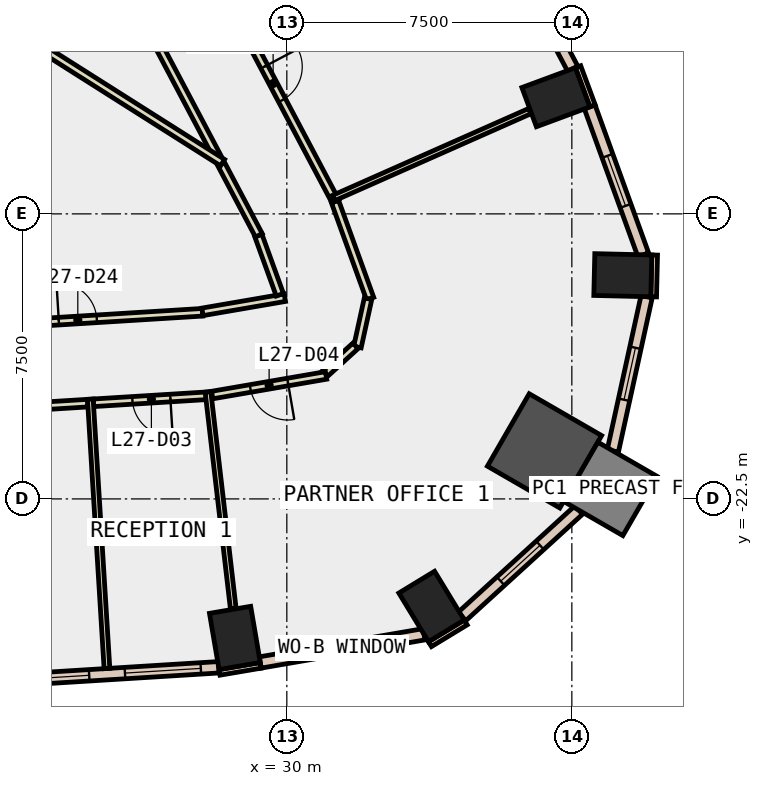
"""IFC4 building model, lengths in metres.
Left out: names, types, materials, properties, quantities, classifications, styles, units other than length and angle.
Written with IfcOpenShell. Run it as: python <this file> out.ifc"""

import sys

from ifc_helpers import new_model, si_unit, direction, frame, frame_2d, origin, origin_2d, place, context, subcontext, project, spatial, rectangle, extrude, element, fill, save


model = new_model("IFC4")
c1 = context("Model", 3, precision=1e-05, world=origin(), true_north=direction((0.0, 1.0)))
c2 = subcontext(c1, "Body", "Model", "MODEL_VIEW")
j1 = project(units=[si_unit("LENGTHUNIT", "METRE"), si_unit("PLANEANGLEUNIT", "RADIAN")], contexts=[c1])
p1 = place(None, origin())
s1 = spatial("IfcSite", under=j1, at=p1, CompositionType="ELEMENT")
p2 = place(p1, origin())
s2 = spatial("IfcBuilding", under=s1, at=p2, CompositionType="ELEMENT")
p3 = place(p2, frame((0.0, 0.0, 124.4)))
s3 = spatial("IfcBuildingStorey", under=s2, at=p3, CompositionType="ELEMENT", Elevation=124.4)
for number, where, z_axis, x_axis in (
    (1, (28.633, -26.158, -0.4), (0.0, 0.0, 1.0), (0.986, 0.168, 0.0)),
    (2, (33.808, -25.331, -0.4), (0.0, 0.0, 1.0), (0.854, 0.52, 0.0)),
):
    element("IfcColumn", number, at=place(p3, frame(where, z_axis=z_axis, x_axis=x_axis)), inside=s3, PredefinedType="COLUMN", context=c2, shape_type="SweptSolid", body=[
        extrude(rectangle(XDim=1.1, YDim=1.5, at=origin_2d()), origin(), (0.0, 0.0, 1.0), 4.2),
    ])
p4 = place(p3, frame((36.781, -21.236, -0.4), z_axis=(0.0, 0.0, 1.0), x_axis=(-0.866025403784, 0.5, 0.0)))
e3 = element("IfcColumn", 3, at=p4, inside=s3, PredefinedType="COLUMN", context=c2, shape_type="SweptSolid", body=[
    extrude(rectangle(XDim=2.2, YDim=2.2, at=origin_2d()), origin(), (0.0, 0.0, 1.0), 4.2),
])
for number, where, z_axis, x_axis in (
    (4, (38.841, -16.614, -0.4), (0.0, 0.0, 1.0), (0.023, 1.0, 0.0)),
    (5, (37.08, -11.931, -0.4), (0.0, 0.0, 1.0), (-0.347, 0.938, 0.0)),
):
    element("IfcColumn", number, at=place(p3, frame(where, z_axis=z_axis, x_axis=x_axis)), inside=s3, PredefinedType="COLUMN", context=c2, shape_type="SweptSolid", body=[
        extrude(rectangle(XDim=1.1, YDim=1.5, at=origin_2d()), origin(), (0.0, 0.0, 1.0), 4.2),
    ])
p5 = place(p3, frame((38.513, -22.236, -0.4), z_axis=(0.0, 0.0, 1.0), x_axis=(-0.866025403784, 0.5, 0.0)))
e6 = element("IfcColumn", 6, at=p5, inside=s3, PredefinedType="COLUMN", context=c2, shape_type="SweptSolid", body=[
    extrude(rectangle(XDim=1.8, YDim=1.8, at=origin_2d()), origin(), (0.0, 0.0, 1.0), 4.2),
])
p6 = place(p3, frame((38.045, -12.16, 0.0), z_axis=(0.0, 0.0, 1.0), x_axis=(-0.347010833361, 0.937861120598, 0.0)))
e7 = element("IfcWall", 7, at=p6, inside=s3, PredefinedType="STANDARD", context=c2, shape_type="SweptSolid", body=[
    extrude(rectangle(XDim=1.1, YDim=0.15, at=frame_2d((0.55, 0.0))), origin(), (0.0, 0.0, 1.0), 3.8),
])
p7 = place(p3, frame((28.229, -27.064, 0.0), z_axis=(0.0, 0.0, 1.0), x_axis=(0.985763338892, 0.168138751323, 0.0)))
e8 = element("IfcWall", 8, at=p7, inside=s3, PredefinedType="STANDARD", context=c2, shape_type="SweptSolid", body=[
    extrude(rectangle(XDim=1.101, YDim=0.15, at=frame_2d((0.55, 0.0))), origin(), (0.0, 0.0, 1.0), 3.8),
])
for number, where, z_axis, x_axis in (
    (9, (33.767, -26.322, 0.0), (0.0, 0.0, 1.0), (0.854, 0.52, 0.0)),
    (10, (39.653, -17.183, 0.0), (0.0, 0.0, 1.0), (0.024, 1.0, 0.0)),
):
    element("IfcWall", number, at=place(p3, frame(where, z_axis=z_axis, x_axis=x_axis)), inside=s3, PredefinedType="STANDARD", context=c2, shape_type="SweptSolid", body=[
        extrude(rectangle(XDim=1.1, YDim=0.15, at=frame_2d((0.55, 0.0))), origin(), (0.0, 0.0, 1.0), 3.8),
    ])
p8 = place(p3, frame((22.332, -27.294, 0.0), z_axis=(0.0, 0.0, 1.0), x_axis=(0.998086636664, 0.061830944626, 0.0)))
e11 = element("IfcWall", 11, at=p8, inside=s3, PredefinedType="STANDARD", context=c2, shape_type="SweptSolid", body=[
    extrude(rectangle(XDim=5.887, YDim=0.3, at=frame_2d((2.944, 0.0))), origin(), (0.0, 0.0, 1.0), 3.8),
])
p9 = place(p8, frame((0.472, 0.0, 0.9)))
e12 = element("IfcOpeningElement", 12, at=p9, cuts=e11, PredefinedType="OPENING", context=c2, shape_type="SweptSolid", body=[
    extrude(rectangle(XDim=2.0, YDim=2.6, at=frame_2d((1.0, 1.3))), frame((0.0, 0.16, 0.0), z_axis=(0.0, -1.0, 0.0), x_axis=(1.0, 0.0, 0.0)), (0.0, 0.0, 1.0), 0.32),
])
p10 = place(p8, frame((3.415, 0.0, 0.9)))
e13 = element("IfcOpeningElement", 13, at=p10, cuts=e11, PredefinedType="OPENING", context=c2, shape_type="SweptSolid", body=[
    extrude(rectangle(XDim=2.0, YDim=2.6, at=frame_2d((1.0, 1.3))), frame((0.0, 0.16, 0.0), z_axis=(0.0, -1.0, 0.0), x_axis=(1.0, 0.0, 0.0)), (0.0, 0.0, 1.0), 0.32),
])
p11 = place(p3, frame((29.3, -26.804, 0.0), z_axis=(0.0, 0.0, 1.0), x_axis=(0.985504881957, 0.169647067875, 0.0)))
e14 = element("IfcWall", 14, at=p11, inside=s3, PredefinedType="STANDARD", context=c2, shape_type="SweptSolid", body=[
    extrude(rectangle(XDim=4.374, YDim=0.3, at=frame_2d((2.187, 0.0))), origin(), (0.0, 0.0, 1.0), 3.8),
])
p12 = place(p11, frame((1.487, 0.0, 0.9)))
e15 = element("IfcOpeningElement", 15, at=p12, cuts=e14, PredefinedType="OPENING", context=c2, shape_type="SweptSolid", body=[
    extrude(rectangle(XDim=1.4, YDim=2.6, at=frame_2d((0.7, 1.3))), frame((0.0, 0.16, 0.0), z_axis=(0.0, -1.0, 0.0), x_axis=(1.0, 0.0, 0.0)), (0.0, 0.0, 1.0), 0.32),
])
p13 = place(p3, frame((34.61, -25.593, 0.0), z_axis=(0.0, 0.0, 1.0), x_axis=(0.738825046606, 0.673897284835, 0.0)))
e16 = element("IfcWall", 16, at=p13, inside=s3, PredefinedType="STANDARD", context=c2, shape_type="SweptSolid", body=[
    extrude(rectangle(XDim=4.155, YDim=0.3, at=frame_2d((2.078, 0.0))), origin(), (0.0, 0.0, 1.0), 3.8),
])
p14 = place(p13, frame((1.378, 0.0, 0.9)))
e17 = element("IfcOpeningElement", 17, at=p14, cuts=e16, PredefinedType="OPENING", context=c2, shape_type="SweptSolid", body=[
    extrude(rectangle(XDim=1.4, YDim=2.6, at=frame_2d((0.7, 1.3))), frame((0.0, 0.16, 0.0), z_axis=(0.0, -1.0, 0.0), x_axis=(1.0, 0.0, 0.0)), (0.0, 0.0, 1.0), 0.32),
])
p15 = place(p3, frame((38.579, -21.236, 0.0), z_axis=(0.0, 0.0, 1.0), x_axis=(0.2139737857, 0.976839402887, 0.0)))
e18 = element("IfcWall", 18, at=p15, inside=s3, PredefinedType="STANDARD", context=c2, shape_type="SweptSolid", body=[
    extrude(rectangle(XDim=4.154, YDim=0.3, at=frame_2d((2.077, 0.0))), origin(), (0.0, 0.0, 1.0), 3.8),
])
p16 = place(p15, frame((1.377, 0.0, 0.9)))
e19 = element("IfcOpeningElement", 19, at=p16, cuts=e18, PredefinedType="OPENING", context=c2, shape_type="SweptSolid", body=[
    extrude(rectangle(XDim=1.4, YDim=2.6, at=frame_2d((0.7, 1.3))), frame((0.0, 0.16, 0.0), z_axis=(0.0, -1.0, 0.0), x_axis=(1.0, 0.0, 0.0)), (0.0, 0.0, 1.0), 0.32),
])
p17 = place(p3, frame((39.379, -16.077, 0.0), z_axis=(0.0, 0.0, 1.0), x_axis=(-0.340477955209, 0.940252499075, 0.0)))
e20 = element("IfcWall", 20, at=p17, inside=s3, PredefinedType="STANDARD", context=c2, shape_type="SweptSolid", body=[
    extrude(rectangle(XDim=4.138, YDim=0.3, at=frame_2d((2.069, 0.0))), origin(), (0.0, 0.0, 1.0), 3.8),
])
p18 = place(p17, frame((1.369, 0.0, 0.9)))
e21 = element("IfcOpeningElement", 21, at=p18, cuts=e20, PredefinedType="OPENING", context=c2, shape_type="SweptSolid", body=[
    extrude(rectangle(XDim=1.4, YDim=2.6, at=frame_2d((0.7, 1.3))), frame((0.0, 0.16, 0.0), z_axis=(0.0, -1.0, 0.0), x_axis=(1.0, 0.0, 0.0)), (0.0, 0.0, 1.0), 0.32),
])
p19 = place(p3, frame((37.523, -11.181, 0.0), z_axis=(0.0, 0.0, 1.0), x_axis=(-0.467654949391, 0.883911108828, 0.0)))
e22 = element("IfcWall", 22, at=p19, inside=s3, PredefinedType="STANDARD", context=c2, shape_type="SweptSolid", body=[
    extrude(rectangle(XDim=6.265, YDim=0.3, at=frame_2d((3.133, 0.0))), origin(), (0.0, 0.0, 1.0), 3.8),
])
p20 = place(p19, frame((0.566, 0.0, 0.9)))
e23 = element("IfcOpeningElement", 23, at=p20, cuts=e22, PredefinedType="OPENING", context=c2, shape_type="SweptSolid", body=[
    extrude(rectangle(XDim=2.0, YDim=2.6, at=frame_2d((1.0, 1.3))), frame((0.0, 0.16, 0.0), z_axis=(0.0, -1.0, 0.0), x_axis=(1.0, 0.0, 0.0)), (0.0, 0.0, 1.0), 0.32),
])
p21 = place(p19, frame((3.699, 0.0, 0.9)))
e24 = element("IfcOpeningElement", 24, at=p21, cuts=e22, PredefinedType="OPENING", context=c2, shape_type="SweptSolid", body=[
    extrude(rectangle(XDim=2.0, YDim=2.6, at=frame_2d((1.0, 1.3))), frame((0.0, 0.16, 0.0), z_axis=(0.0, -1.0, 0.0), x_axis=(1.0, 0.0, 0.0)), (0.0, 0.0, 1.0), 0.32),
])
p22 = place(p3, frame((21.218, -17.995, 0.0), z_axis=(0.0, 0.0, 1.0), x_axis=(0.998092528214, 0.061735768594, 0.0)))
e25 = element("IfcWall", 25, at=p22, inside=s3, PredefinedType="PARTITIONING", context=c2, shape_type="SweptSolid", body=[
    extrude(rectangle(XDim=6.576, YDim=0.2, at=frame_2d((3.288, 0.0))), origin(), (0.0, 0.0, 1.0), 3.8),
])
p23 = place(p22, frame((2.788, 0.0, 0.0)))
e26 = element("IfcOpeningElement", 26, at=p23, cuts=e25, PredefinedType="OPENING", context=c2, shape_type="SweptSolid", body=[
    extrude(rectangle(XDim=1.0, YDim=2.1, at=frame_2d((0.5, 1.05))), frame((0.0, 0.11, 0.0), z_axis=(0.0, -1.0, 0.0), x_axis=(1.0, 0.0, 0.0)), (0.0, 0.0, 1.0), 0.22),
])
p24 = place(p3, frame((27.78, -17.578, 0.0), z_axis=(0.0, 0.0, 1.0), x_axis=(0.985534991456, 0.169472064409, 0.0)))
e27 = element("IfcWall", 27, at=p24, inside=s3, PredefinedType="PARTITIONING", context=c2, shape_type="SweptSolid", body=[
    extrude(rectangle(XDim=2.2, YDim=0.2, at=frame_2d((1.1, 0.0))), origin(), (0.0, 0.0, 1.0), 3.8),
])
p25 = place(p3, frame((29.816, -17.128, 0.0), z_axis=(0.0, 0.0, 1.0), x_axis=(-0.340726116699, 0.940162599447, 0.0)))
e28 = element("IfcWall", 28, at=p25, inside=s3, PredefinedType="PARTITIONING", context=c2, shape_type="SweptSolid", body=[
    extrude(rectangle(XDim=1.658, YDim=0.2, at=frame_2d((0.829, 0.0))), origin(), (0.0, 0.0, 1.0), 3.8),
])
p26 = place(p3, frame((29.264, -15.564, 0.0), z_axis=(0.0, 0.0, 1.0), x_axis=(-0.46760771465, 0.883936097917, 0.0)))
e29 = element("IfcWall", 29, at=p26, inside=s3, PredefinedType="PARTITIONING", context=c2, shape_type="SweptSolid", body=[
    extrude(rectangle(XDim=2.123, YDim=0.2, at=frame_2d((1.062, 0.0))), origin(), (0.0, 0.0, 1.0), 3.8),
])
p27 = place(p3, frame((28.177, -13.51, 0.0), z_axis=(0.0, 0.0, 1.0), x_axis=(-0.467580354248, 0.883950571198, 0.0)))
e30 = element("IfcWall", 30, at=p27, inside=s3, PredefinedType="PARTITIONING", context=c2, shape_type="SweptSolid", body=[
    extrude(rectangle(XDim=4.453, YDim=0.2, at=frame_2d((2.227, 0.0))), origin(), (0.0, 0.0, 1.0), 3.8),
])
p28 = place(p3, frame((24.76, -19.98, 0.0), z_axis=(0.0, 0.0, 1.0), x_axis=(-0.998092137917, -0.061742078267, 0.0)))
e31 = element("IfcWall", 31, at=p28, inside=s3, PredefinedType="PARTITIONING", context=c2, shape_type="SweptSolid", body=[
    extrude(rectangle(XDim=3.417, YDim=0.2, at=frame_2d((1.708, 0.0))), origin(), (0.0, 0.0, 1.0), 3.8),
])
p29 = place(p3, frame((27.962, -19.782, 0.0), z_axis=(0.0, 0.0, 1.0), x_axis=(-0.998088756763, -0.061796712082, 0.0)))
e32 = element("IfcWall", 32, at=p29, inside=s3, PredefinedType="PARTITIONING", context=c2, shape_type="SweptSolid", body=[
    extrude(rectangle(XDim=3.058, YDim=0.2, at=frame_2d((1.529, 0.0))), origin(), (0.0, 0.0, 1.0), 3.8),
])
p30 = place(p29, frame((1.029, 0.0, 0.0)))
e33 = element("IfcOpeningElement", 33, at=p30, cuts=e32, PredefinedType="OPENING", context=c2, shape_type="SweptSolid", body=[
    extrude(rectangle(XDim=1.0, YDim=2.1, at=frame_2d((0.5, 1.05))), frame((0.0, 0.11, 0.0), z_axis=(0.0, -1.0, 0.0), x_axis=(1.0, 0.0, 0.0)), (0.0, 0.0, 1.0), 0.22),
])
p31 = place(p3, frame((31.268, -14.676, 0.0), z_axis=(0.0, 0.0, 1.0), x_axis=(0.340269739222, -0.940327870782, 0.0)))
e34 = element("IfcWall", 34, at=p31, inside=s3, PredefinedType="PARTITIONING", context=c2, shape_type="SweptSolid", body=[
    extrude(rectangle(XDim=2.715, YDim=0.2, at=frame_2d((1.357, 0.0))), origin(), (0.0, 0.0, 1.0), 3.8),
])
p32 = place(p3, frame((32.137, -17.232, 0.0), z_axis=(0.0, 0.0, 1.0), x_axis=(-0.214289506547, -0.976770191695, 0.0)))
e35 = element("IfcWall", 35, at=p32, inside=s3, PredefinedType="PARTITIONING", context=c2, shape_type="SweptSolid", body=[
    extrude(rectangle(XDim=1.302, YDim=0.2, at=frame_2d((0.651, 0.0))), origin(), (0.0, 0.0, 1.0), 3.8),
])
p33 = place(p3, frame((31.806, -18.473, 0.0), z_axis=(0.0, 0.0, 1.0), x_axis=(-0.739141286173, -0.673550413165, 0.0)))
e36 = element("IfcWall", 36, at=p33, inside=s3, PredefinedType="PARTITIONING", context=c2, shape_type="SweptSolid", body=[
    extrude(rectangle(XDim=1.079, YDim=0.2, at=frame_2d((0.54, 0.0))), origin(), (0.0, 0.0, 1.0), 3.8),
])
p34 = place(p3, frame((31.033, -19.251, 0.0), z_axis=(0.0, 0.0, 1.0), x_axis=(-0.985494394638, -0.169707979005, 0.0)))
e37 = element("IfcWall", 37, at=p34, inside=s3, PredefinedType="PARTITIONING", context=c2, shape_type="SweptSolid", body=[
    extrude(rectangle(XDim=3.041, YDim=0.2, at=frame_2d((1.521, 0.0))), origin(), (0.0, 0.0, 1.0), 3.8),
])
p35 = place(p34, frame((1.021, 0.0, 0.0)))
e38 = element("IfcOpeningElement", 38, at=p35, cuts=e37, PredefinedType="OPENING", context=c2, shape_type="SweptSolid", body=[
    extrude(rectangle(XDim=1.0, YDim=2.1, at=frame_2d((0.5, 1.05))), frame((0.0, 0.11, 0.0), z_axis=(0.0, -1.0, 0.0), x_axis=(1.0, 0.0, 0.0)), (0.0, 0.0, 1.0), 0.22),
])
p36 = place(p3, frame((27.999, -8.469, 0.0), z_axis=(0.0, 0.0, 1.0), x_axis=(0.467683043694, -0.883896244274, 0.0)))
e39 = element("IfcWall", 39, at=p36, inside=s3, PredefinedType="PARTITIONING", context=c2, shape_type="SweptSolid", body=[
    extrude(rectangle(XDim=7.015, YDim=0.2, at=frame_2d((3.508, 0.0))), origin(), (0.0, 0.0, 1.0), 3.8),
])
p37 = place(p36, frame((3.008, 0.0, 0.0)))
e40 = element("IfcOpeningElement", 40, at=p37, cuts=e39, PredefinedType="OPENING", context=c2, shape_type="SweptSolid", body=[
    extrude(rectangle(XDim=1.0, YDim=2.1, at=frame_2d((0.5, 1.05))), frame((0.0, 0.11, 0.0), z_axis=(0.0, -1.0, 0.0), x_axis=(1.0, 0.0, 0.0)), (0.0, 0.0, 1.0), 0.22),
])
p38 = place(p3, frame((20.853, -8.931, 0.0), z_axis=(0.0, 0.0, 1.0), x_axis=(0.844869091455, -0.534973100542, 0.0)))
e41 = element("IfcWall", 41, at=p38, inside=s3, PredefinedType="PARTITIONING", context=c2, shape_type="SweptSolid", body=[
    extrude(rectangle(XDim=8.825, YDim=0.2, at=frame_2d((4.413, 0.0))), origin(), (0.0, 0.0, 1.0), 3.8),
])
p39 = place(p3, frame((24.829, -19.876, 0.0), z_axis=(0.0, 0.0, 1.0), x_axis=(0.061693175316, -0.998095161856, 0.0)))
e42 = element("IfcWall", 42, at=p39, inside=s3, PredefinedType="PARTITIONING", context=c2, shape_type="SweptSolid", body=[
    extrude(rectangle(XDim=7.099, YDim=0.15, at=frame_2d((3.55, 0.0))), origin(), (0.0, 0.0, 1.0), 3.8),
])
p40 = place(p3, frame((27.925, -19.684, 0.0), z_axis=(0.0, 0.0, 1.0), x_axis=(0.115888394456, -0.993262241319, 0.0)))
e43 = element("IfcWall", 43, at=p40, inside=s3, PredefinedType="PARTITIONING", context=c2, shape_type="SweptSolid", body=[
    extrude(rectangle(XDim=5.739, YDim=0.15, at=frame_2d((2.869, 0.0))), origin(), (0.0, 0.0, 1.0), 3.8),
])
p41 = place(p3, frame((31.233, -14.582, 0.0), z_axis=(0.0, 0.0, 1.0), x_axis=(0.914317360249, 0.404998474994, 0.0)))
e44 = element("IfcWall", 44, at=p41, inside=s3, PredefinedType="PARTITIONING", context=c2, shape_type="SweptSolid", body=[
    extrude(rectangle(XDim=5.645, YDim=0.15, at=frame_2d((2.822, 0.0))), origin(), (0.0, 0.0, 1.0), 3.8),
])
p42 = place(p9, origin())
e45 = element("IfcWindow", 45, at=p42, inside=s3, PartitioningType="SINGLE_PANEL", PredefinedType="WINDOW", context=c2, shape_type="SweptSolid", body=[
    extrude(rectangle(XDim=2.0, YDim=2.6, at=frame_2d((1.0, 1.3))), frame((0.0, 0.03, 0.0), z_axis=(0.0, -1.0, 0.0), x_axis=(1.0, 0.0, 0.0)), (0.0, 0.0, 1.0), 0.06),
])
fill(e12, e45)
p43 = place(p10, origin())
e46 = element("IfcWindow", 46, at=p43, inside=s3, PartitioningType="SINGLE_PANEL", PredefinedType="WINDOW", context=c2, shape_type="SweptSolid", body=[
    extrude(rectangle(XDim=2.0, YDim=2.6, at=frame_2d((1.0, 1.3))), frame((0.0, 0.03, 0.0), z_axis=(0.0, -1.0, 0.0), x_axis=(1.0, 0.0, 0.0)), (0.0, 0.0, 1.0), 0.06),
])
fill(e13, e46)
p44 = place(p12, origin())
e47 = element("IfcWindow", 47, at=p44, inside=s3, PartitioningType="SINGLE_PANEL", PredefinedType="WINDOW", context=c2, shape_type="SweptSolid", body=[
    extrude(rectangle(XDim=1.4, YDim=2.6, at=frame_2d((0.7, 1.3))), frame((0.0, 0.03, 0.0), z_axis=(0.0, -1.0, 0.0), x_axis=(1.0, 0.0, 0.0)), (0.0, 0.0, 1.0), 0.06),
])
fill(e15, e47)
p45 = place(p14, origin())
e48 = element("IfcWindow", 48, at=p45, inside=s3, PartitioningType="SINGLE_PANEL", PredefinedType="WINDOW", context=c2, shape_type="SweptSolid", body=[
    extrude(rectangle(XDim=1.4, YDim=2.6, at=frame_2d((0.7, 1.3))), frame((0.0, 0.03, 0.0), z_axis=(0.0, -1.0, 0.0), x_axis=(1.0, 0.0, 0.0)), (0.0, 0.0, 1.0), 0.06),
])
fill(e17, e48)
p46 = place(p16, origin())
e49 = element("IfcWindow", 49, at=p46, inside=s3, PartitioningType="SINGLE_PANEL", PredefinedType="WINDOW", context=c2, shape_type="SweptSolid", body=[
    extrude(rectangle(XDim=1.4, YDim=2.6, at=frame_2d((0.7, 1.3))), frame((0.0, 0.03, 0.0), z_axis=(0.0, -1.0, 0.0), x_axis=(1.0, 0.0, 0.0)), (0.0, 0.0, 1.0), 0.06),
])
fill(e19, e49)
p47 = place(p18, origin())
e50 = element("IfcWindow", 50, at=p47, inside=s3, PartitioningType="SINGLE_PANEL", PredefinedType="WINDOW", context=c2, shape_type="SweptSolid", body=[
    extrude(rectangle(XDim=1.4, YDim=2.6, at=frame_2d((0.7, 1.3))), frame((0.0, 0.03, 0.0), z_axis=(0.0, -1.0, 0.0), x_axis=(1.0, 0.0, 0.0)), (0.0, 0.0, 1.0), 0.06),
])
fill(e21, e50)
p48 = place(p30, origin())
e51 = element("IfcDoor", 51, at=p48, inside=s3, OperationType="SINGLE_SWING_RIGHT", PredefinedType="DOOR", context=c2, shape_type="SweptSolid", body=[
    extrude(rectangle(XDim=1.0, YDim=2.1, at=frame_2d((0.5, 1.05))), frame((0.0, 0.025, 0.0), z_axis=(0.0, -1.0, 0.0), x_axis=(1.0, 0.0, 0.0)), (0.0, 0.0, 1.0), 0.05),
])
fill(e33, e51)
p49 = place(p35, origin())
e52 = element("IfcDoor", 52, at=p49, inside=s3, OperationType="SINGLE_SWING_LEFT", PredefinedType="DOOR", context=c2, shape_type="SweptSolid", body=[
    extrude(rectangle(XDim=1.0, YDim=2.1, at=frame_2d((0.5, 1.05))), frame((0.0, 0.025, 0.0), z_axis=(0.0, -1.0, 0.0), x_axis=(1.0, 0.0, 0.0)), (0.0, 0.0, 1.0), 0.05),
])
fill(e38, e52)
p50 = place(p37, origin())
e53 = element("IfcDoor", 53, at=p50, inside=s3, OperationType="SINGLE_SWING_LEFT", PredefinedType="DOOR", context=c2, shape_type="SweptSolid", body=[
    extrude(rectangle(XDim=1.0, YDim=2.1, at=frame_2d((0.5, 1.05))), frame((0.0, 0.025, 0.0), z_axis=(0.0, -1.0, 0.0), x_axis=(1.0, 0.0, 0.0)), (0.0, 0.0, 1.0), 0.05),
])
fill(e40, e53)
p51 = place(p23, origin())
e54 = element("IfcDoor", 54, at=p51, inside=s3, OperationType="SINGLE_SWING_LEFT", PredefinedType="DOOR", context=c2, shape_type="SweptSolid", body=[
    extrude(rectangle(XDim=1.0, YDim=2.1, at=frame_2d((0.5, 1.05))), frame((0.0, 0.025, 0.0), z_axis=(0.0, -1.0, 0.0), x_axis=(1.0, 0.0, 0.0)), (0.0, 0.0, 1.0), 0.05),
])
fill(e26, e54)
save(model, sys.argv[1])
